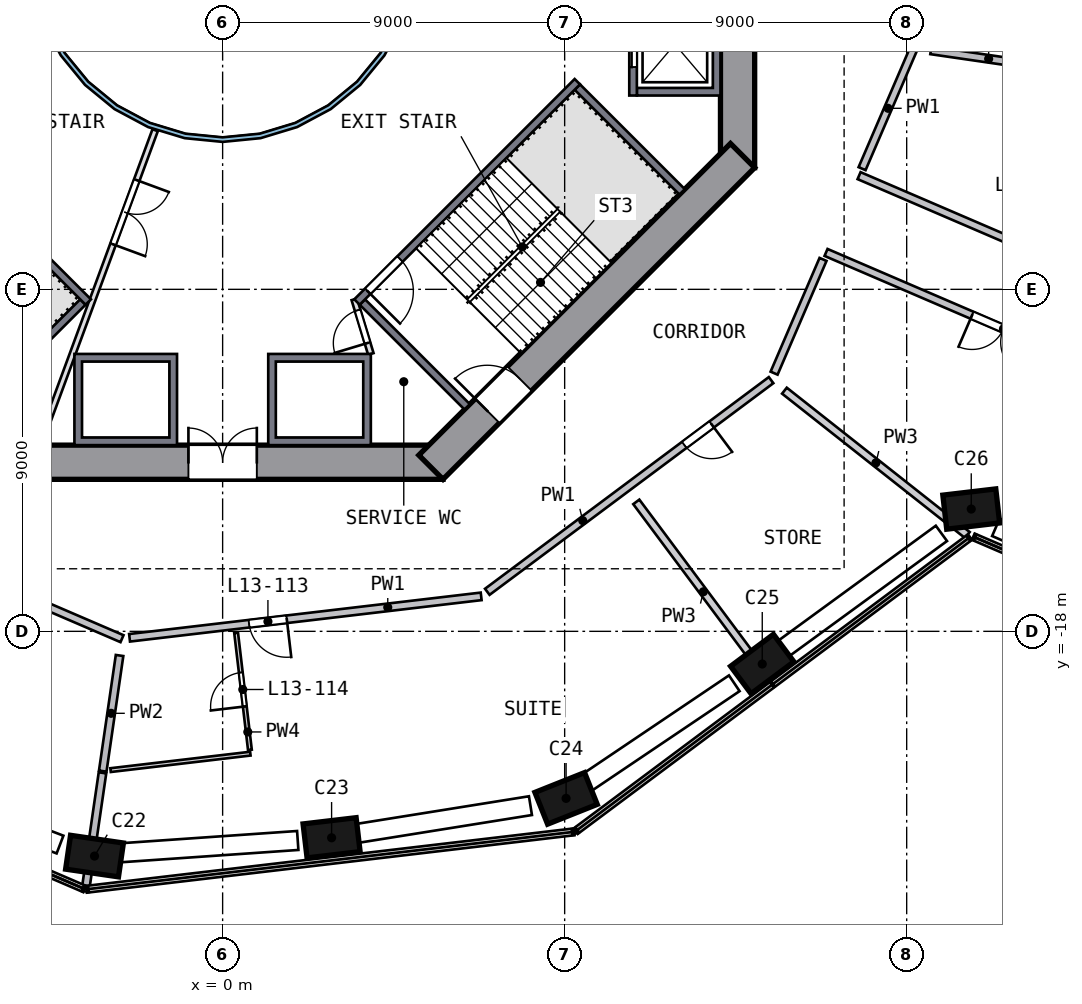
"""IFC4 building model, lengths in metres.
Left out: names, types, materials, properties, quantities, classifications, styles, units other than length and angle.
Written with IfcOpenShell. Run it as: python <this file> out.ifc"""

import sys

from ifc_helpers import new_model, si_unit, direction, frame, frame_2d, origin, origin_2d, place, context, subcontext, project, spatial, polyline, rectangle, outline, extrude, element, fill, save


model = new_model("IFC4")
c1 = context("Model", 3, precision=1e-05, world=origin(), true_north=direction((0.0, 1.0)))
c2 = subcontext(c1, "Body", "Model", "MODEL_VIEW")
j1 = project(units=[si_unit("LENGTHUNIT", "METRE"), si_unit("PLANEANGLEUNIT", "RADIAN")], contexts=[c1])
p1 = place(None, origin())
s1 = spatial("IfcSite", under=j1, at=p1, CompositionType="ELEMENT")
p2 = place(p1, origin())
s2 = spatial("IfcBuilding", under=s1, at=p2, CompositionType="ELEMENT")
p3 = place(p2, frame((0.0, 0.0, 60.0)))
s3 = spatial("IfcBuildingStorey", under=s2, at=p3, CompositionType="ELEMENT", Elevation=60.0)
p4 = place(p3, frame((-3.478, -23.899, 0.0), z_axis=(0.0887341, -0.012187156, 0.995980789), x_axis=(-0.985538451, 0.143848052, 0.089563943)))
e1 = element("IfcColumn", 1, at=p4, inside=s3, PredefinedType="COLUMN", context=c2, shape_type="SweptSolid", body=[
    extrude(rectangle(XDim=1.4, YDim=0.9, at=origin_2d()), origin(), (0.0, 0.0, 1.0), 4.207),
])
p5 = place(p3, frame((2.763, -23.446, 0.0), z_axis=(0.0868348, 0.010970439, 0.99616232), x_axis=(0.989325596, 0.116510829, -0.087521946)))
e2 = element("IfcColumn", 2, at=p5, inside=s3, PredefinedType="COLUMN", context=c2, shape_type="SweptSolid", body=[
    extrude(rectangle(XDim=1.4, YDim=0.9, at=origin_2d()), origin(), (0.0, 0.0, 1.0), 4.206),
])
p6 = place(p3, frame((8.938, -22.437, 0.0), z_axis=(0.082930694, 0.033833866, 0.995980808), x_axis=(-0.925330874, -0.368430604, 0.089563737)))
e3 = element("IfcColumn", 3, at=p6, inside=s3, PredefinedType="COLUMN", context=c2, shape_type="SweptSolid", body=[
    extrude(rectangle(XDim=1.4, YDim=0.9, at=origin_2d()), origin(), (0.0, 0.0, 1.0), 4.207),
])
p7 = place(p3, frame((14.115, -18.924, 0.0), z_axis=(0.069769341, 0.052936472, 0.996157602), x_axis=(0.798641913, 0.595400375, -0.087575616)))
e4 = element("IfcColumn", 4, at=p7, inside=s3, PredefinedType="COLUMN", context=c2, shape_type="SweptSolid", body=[
    extrude(rectangle(XDim=1.4, YDim=0.9, at=origin_2d()), origin(), (0.0, 0.0, 1.0), 4.206),
])
p8 = place(p3, frame((19.633, -14.87, 0.0), z_axis=(0.054543369, 0.073227374, 0.995822661), x_axis=(-0.99170285, -0.112293396, 0.062575163)))
e5 = element("IfcColumn", 5, at=p8, inside=s3, PredefinedType="COLUMN", context=c2, shape_type="SweptSolid", body=[
    extrude(rectangle(XDim=1.4, YDim=0.9, at=origin_2d()), origin(), (0.0, 0.0, 1.0), 4.208),
])
p9 = place(p3, frame((13.55, -5.799, 0.0), z_axis=(0.0, 0.0, 1.0), x_axis=(0.0, 1.0, 0.0)))
e6 = element("IfcWall", 6, at=p9, inside=s3, PredefinedType="SHEAR", context=c2, shape_type="SweptSolid", body=[
    extrude(rectangle(XDim=11.598, YDim=0.9, at=frame_2d((5.799, 0.0))), origin(), (0.0, 0.0, 1.0), 4.5),
])
p10 = place(p9, frame((4.899, 0.0, 0.0)))
e7 = element("IfcOpeningElement", 7, at=p10, cuts=e6, PredefinedType="OPENING", context=c2, shape_type="SweptSolid", body=[
    extrude(rectangle(XDim=1.8, YDim=2.1, at=frame_2d((0.9, 1.05))), frame((0.0, 0.46, 0.0), z_axis=(0.0, -1.0, 0.0), x_axis=(1.0, 0.0, 0.0)), (0.0, 0.0, 1.0), 0.92),
])
p11 = place(p3, frame((-5.799, -13.55, 0.0), z_axis=(0.0, 0.0, 1.0), x_axis=(1.0, 0.0, 0.0)))
e8 = element("IfcWall", 8, at=p11, inside=s3, PredefinedType="SHEAR", context=c2, shape_type="SweptSolid", body=[
    extrude(rectangle(XDim=11.598, YDim=0.9, at=frame_2d((5.799, 0.0))), origin(), (0.0, 0.0, 1.0), 4.5),
])
p12 = place(p11, frame((4.899, 0.0, 0.0)))
e9 = element("IfcOpeningElement", 9, at=p12, cuts=e8, PredefinedType="OPENING", context=c2, shape_type="SweptSolid", body=[
    extrude(rectangle(XDim=1.8, YDim=2.1, at=frame_2d((0.9, 1.05))), frame((0.0, 0.46, 0.0), z_axis=(0.0, -1.0, 0.0), x_axis=(1.0, 0.0, 0.0)), (0.0, 0.0, 1.0), 0.92),
])
p13 = place(p3, frame((5.481, -13.682, 0.0), z_axis=(0.0, 0.0, 1.0), x_axis=(0.707106781, 0.707106781, 0.0)))
e10 = element("IfcWall", 10, at=p13, inside=s3, PredefinedType="SHEAR", context=c2, shape_type="SweptSolid", body=[
    extrude(rectangle(XDim=11.598, YDim=0.9, at=frame_2d((5.799, 0.0))), origin(), (0.0, 0.0, 1.0), 4.5),
])
p14 = place(p13, frame((2.099, 0.0, 0.0)))
e11 = element("IfcOpeningElement", 11, at=p14, cuts=e10, PredefinedType="OPENING", context=c2, shape_type="SweptSolid", body=[
    extrude(rectangle(XDim=1.2, YDim=2.1, at=frame_2d((0.6, 1.05))), frame((0.0, 0.46, 0.0), z_axis=(0.0, -1.0, 0.0), x_axis=(1.0, 0.0, 0.0)), (0.0, 0.0, 1.0), 0.92),
])
p15 = place(p3, origin())
e12 = element("IfcWall", 12, at=p15, inside=s3, PredefinedType="SOLIDWALL", context=c2, shape_type="SweptSolid", body=[
    extrude(outline(polyline([(13.1, -3.9), (10.9, -3.9), (10.9, -3.7), (12.9, -3.7), (12.9, -1.4), (10.9, -1.4), (10.9, -1.2), (13.1, -1.2), (13.1, -3.9)])), origin(), (0.0, 0.0, 1.0), 4.19),
])
p16 = place(p3, frame((10.8, -1.2, 0.0), z_axis=(0.0, 0.0, 1.0), x_axis=(0.0, -1.0, 0.0)))
e13 = element("IfcWall", 13, at=p16, inside=s3, PredefinedType="SOLIDWALL", context=c2, shape_type="SweptSolid", body=[
    extrude(rectangle(XDim=2.7, YDim=0.2, at=frame_2d((1.35, 0.0))), origin(), (0.0, 0.0, 1.0), 4.19),
])
p17 = place(p16, frame((0.75, 0.0, 0.0)))
e14 = element("IfcOpeningElement", 14, at=p17, cuts=e13, PredefinedType="OPENING", context=c2, shape_type="SweptSolid", body=[
    extrude(rectangle(XDim=1.2, YDim=2.1, at=frame_2d((0.6, 1.05))), frame((0.0, 0.11, 0.0), z_axis=(0.0, -1.0, 0.0), x_axis=(1.0, 0.0, 0.0)), (0.0, 0.0, 1.0), 0.22),
])
p18 = place(p3, origin())
e15 = element("IfcWall", 15, at=p18, inside=s3, PredefinedType="SOLIDWALL", context=c2, shape_type="SweptSolid", body=[
    extrude(outline(polyline([(-1.2, -13.1), (-3.9, -13.1), (-3.9, -10.7), (-1.2, -10.7), (-1.2, -13.1)]), holes=[polyline([(-3.7, -10.9), (-3.7, -12.9), (-1.4, -12.9), (-1.4, -10.9), (-3.7, -10.9)])]), origin(), (0.0, 0.0, 1.0), 4.19),
])
p19 = place(p3, origin())
e16 = element("IfcWall", 16, at=p19, inside=s3, PredefinedType="SOLIDWALL", context=c2, shape_type="SweptSolid", body=[
    extrude(outline(polyline([(3.9, -10.7), (3.9, -13.1), (1.2, -13.1), (1.2, -10.7), (3.9, -10.7)]), holes=[polyline([(1.4, -12.9), (3.7, -12.9), (3.7, -10.9), (1.4, -10.9), (1.4, -12.9)])]), origin(), (0.0, 0.0, 1.0), 4.19),
])
p20 = place(p3, frame((-3.535, -9.334, 0.0), z_axis=(0.0, 0.0, 1.0), x_axis=(-0.707106781, 0.707106781, 0.0)))
e17 = element("IfcWall", 17, at=p20, inside=s3, PredefinedType="SOLIDWALL", context=c2, shape_type="SweptSolid", body=[
    extrude(rectangle(XDim=8.2, YDim=0.2, at=frame_2d((4.1, 0.0))), origin(), (0.0, 0.0, 1.0), 4.19),
])
p21 = place(p20, frame((6.6, 0.0, 0.0)))
e18 = element("IfcOpeningElement", 18, at=p21, cuts=e17, PredefinedType="OPENING", context=c2, shape_type="SweptSolid", body=[
    extrude(rectangle(XDim=1.2, YDim=2.1, at=frame_2d((0.6, 1.05))), frame((0.0, 0.11, 0.0), z_axis=(0.0, -1.0, 0.0), x_axis=(1.0, 0.0, 0.0)), (0.0, 0.0, 1.0), 0.22),
])
p22 = place(p3, frame((-3.677, -9.334, 0.0), z_axis=(0.0, 0.0, 1.0), x_axis=(-0.707106781, -0.707106781, 0.0)))
e19 = element("IfcWall", 19, at=p22, inside=s3, PredefinedType="SOLIDWALL", context=c2, shape_type="SweptSolid", body=[
    extrude(rectangle(XDim=3.9, YDim=0.2, at=frame_2d((1.95, 0.0))), origin(), (0.0, 0.0, 1.0), 4.19),
])
p23 = place(p3, frame((9.334, -3.535, 0.0), z_axis=(0.0, 0.0, 1.0), x_axis=(-0.707106781, -0.707106781, 0.0)))
e20 = element("IfcWall", 20, at=p23, inside=s3, PredefinedType="SOLIDWALL", context=c2, shape_type="SweptSolid", body=[
    extrude(rectangle(XDim=8.2, YDim=0.2, at=frame_2d((4.1, 0.0))), origin(), (0.0, 0.0, 1.0), 4.19),
])
p24 = place(p23, frame((6.6, 0.0, 0.0)))
e21 = element("IfcOpeningElement", 21, at=p24, cuts=e20, PredefinedType="OPENING", context=c2, shape_type="SweptSolid", body=[
    extrude(rectangle(XDim=1.2, YDim=2.1, at=frame_2d((0.6, 1.05))), frame((0.0, 0.11, 0.0), z_axis=(0.0, -1.0, 0.0), x_axis=(1.0, 0.0, 0.0)), (0.0, 0.0, 1.0), 0.22),
])
for number, where, z_axis, x_axis in (
    (22, (3.677, -9.334, 0.0), (0.0, 0.0, 1.0), (0.707, -0.707, 0.0)),
    (23, (9.334, -3.677, 0.0), (0.0, 0.0, 1.0), (0.707, -0.707, 0.0)),
):
    element("IfcWall", number, at=place(p3, frame(where, z_axis=z_axis, x_axis=x_axis)), inside=s3, PredefinedType="SOLIDWALL", context=c2, shape_type="SweptSolid", body=[
        extrude(rectangle(XDim=3.9, YDim=0.2, at=frame_2d((1.95, 0.0))), origin(), (0.0, 0.0, 1.0), 4.19),
    ])
p25 = place(p3, frame((3.9, -10.7, 0.0), z_axis=(0.0, 0.0, 1.0), x_axis=(-0.289808785, 0.957084567, 0.0)))
e24 = element("IfcWall", 24, at=p25, inside=s3, PredefinedType="PARTITIONING", context=c2, shape_type="SweptSolid", body=[
    extrude(rectangle(XDim=1.501, YDim=0.15, at=frame_2d((0.75, 0.0))), origin(), (0.0, 0.0, 1.0), 4.19),
])
p26 = place(p25, frame((0.301, 0.0, 0.0)))
e25 = element("IfcOpeningElement", 25, at=p26, cuts=e24, PredefinedType="OPENING", context=c2, shape_type="SweptSolid", body=[
    extrude(rectangle(XDim=0.9, YDim=2.1, at=frame_2d((0.45, 1.05))), frame((0.0, 0.085, 0.0), z_axis=(0.0, -1.0, 0.0), x_axis=(1.0, 0.0, 0.0)), (0.0, 0.0, 1.0), 0.17),
])
p27 = place(p3, frame((-1.776, -4.813, 0.0), z_axis=(0.0, 0.0, 1.0), x_axis=(-0.346112737, -0.93819293, 0.0)))
e26 = element("IfcWall", 26, at=p27, inside=s3, PredefinedType="PARTITIONING", context=c2, shape_type="SweptSolid", body=[
    extrude(rectangle(XDim=8.803, YDim=0.15, at=frame_2d((4.402, 0.0))), origin(), (0.0, 0.0, 1.0), 4.19),
])
p28 = place(p27, frame((1.4, 0.0, 0.0)))
e27 = element("IfcOpeningElement", 27, at=p28, cuts=e26, PredefinedType="OPENING", context=c2, shape_type="SweptSolid", body=[
    extrude(rectangle(XDim=1.8, YDim=2.1, at=frame_2d((0.9, 1.05))), frame((0.0, 0.085, 0.0), z_axis=(0.0, -1.0, 0.0), x_axis=(1.0, 0.0, 0.0)), (0.0, 0.0, 1.0), 0.17),
])
p29 = place(p3, origin())
e28 = element("IfcWall", 28, at=p29, inside=s3, PredefinedType="SOLIDWALL", context=c2, shape_type="SweptSolid", body=[
    extrude(outline(polyline([(5.021, -0.999), (4.73, -1.959), (4.257, -2.844), (3.62, -3.62), (2.844, -4.257), (1.959, -4.73), (0.999, -5.021), (0.0, -5.12), (-0.999, -5.021), (-1.959, -4.73), (-2.844, -4.257), (-3.62, -3.62), (-4.257, -2.844), (-4.73, -1.959), (-5.021, -0.999), (-5.12, 0.0), (-5.021, 0.999), (-4.73, 1.959), (-4.257, 2.844), (-3.62, 3.62), (-2.844, 4.257), (-1.959, 4.73), (-0.999, 5.021), (0.0, 5.12), (0.999, 5.021), (1.959, 4.73), (2.844, 4.257), (3.62, 3.62), (4.257, 2.844), (4.73, 1.959), (5.021, 0.999), (5.12, 0.0), (5.021, -0.999)]), holes=[polyline([(4.904, 0.976), (4.619, 1.913), (4.157, 2.778), (3.535, 3.535), (2.778, 4.157), (1.913, 4.619), (0.976, 4.904), (0.0, 5.0), (-0.976, 4.904), (-1.913, 4.619), (-2.778, 4.157), (-3.535, 3.535), (-4.157, 2.778), (-4.619, 1.913), (-4.904, 0.976), (-5.0, 0.0), (-4.904, -0.976), (-4.619, -1.913), (-4.157, -2.778), (-3.535, -3.535), (-2.778, -4.157), (-1.913, -4.619), (-0.976, -4.904), (0.0, -5.0), (0.976, -4.904), (1.913, -4.619), (2.778, -4.157), (3.535, -3.535), (4.157, -2.778), (4.619, -1.913), (4.904, -0.976), (5.0, 0.0), (4.904, 0.976)])]), origin(), (0.0, 0.0, 1.0), 4.19),
])
p30 = place(p3, frame((-2.648, -18.193, 0.0), z_axis=(0.0, 0.0, 1.0), x_axis=(-0.918585672, 0.395221918, 0.0)))
e29 = element("IfcWall", 29, at=p30, inside=s3, PredefinedType="SOLIDWALL", context=c2, shape_type="SweptSolid", body=[
    extrude(rectangle(XDim=9.317, YDim=0.2, at=frame_2d((4.658, 0.0))), origin(), (0.0, 0.0, 1.0), 4.19),
])
p31 = place(p30, frame((5.15, 0.0, 0.0)))
e30 = element("IfcOpeningElement", 30, at=p31, cuts=e29, PredefinedType="OPENING", context=c2, shape_type="SweptSolid", body=[
    extrude(rectangle(XDim=1.0, YDim=2.1, at=frame_2d((0.5, 1.05))), frame((0.0, 0.11, 0.0), z_axis=(0.0, -1.0, 0.0), x_axis=(1.0, 0.0, 0.0)), (0.0, 0.0, 1.0), 0.22),
])
p32 = place(p3, frame((6.803, -17.08, 0.0), z_axis=(0.0, 0.0, 1.0), x_axis=(-0.993130375, -0.117013065, 0.0)))
e31 = element("IfcWall", 31, at=p32, inside=s3, PredefinedType="SOLIDWALL", context=c2, shape_type="SweptSolid", body=[
    extrude(rectangle(XDim=9.316, YDim=0.2, at=frame_2d((4.658, 0.0))), origin(), (0.0, 0.0, 1.0), 4.19),
])
p33 = place(p32, frame((5.15, 0.0, 0.0)))
e32 = element("IfcOpeningElement", 32, at=p33, cuts=e31, PredefinedType="OPENING", context=c2, shape_type="SweptSolid", body=[
    extrude(rectangle(XDim=1.0, YDim=2.1, at=frame_2d((0.5, 1.05))), frame((0.0, 0.11, 0.0), z_axis=(0.0, -1.0, 0.0), x_axis=(1.0, 0.0, 0.0)), (0.0, 0.0, 1.0), 0.22),
])
p34 = place(p3, frame((14.432, -11.389, 0.0), z_axis=(0.0, 0.0, 1.0), x_axis=(-0.801560206, -0.59791407, 0.0)))
e33 = element("IfcWall", 33, at=p34, inside=s3, PredefinedType="SOLIDWALL", context=c2, shape_type="SweptSolid", body=[
    extrude(rectangle(XDim=9.316, YDim=0.2, at=frame_2d((4.658, 0.0))), origin(), (0.0, 0.0, 1.0), 4.19),
])
p35 = place(p34, frame((1.95, 0.0, 0.0)))
e34 = element("IfcOpeningElement", 34, at=p35, cuts=e33, PredefinedType="OPENING", context=c2, shape_type="SweptSolid", body=[
    extrude(rectangle(XDim=0.9, YDim=2.1, at=frame_2d((0.45, 1.05))), frame((0.0, 0.11, 0.0), z_axis=(0.0, -1.0, 0.0), x_axis=(1.0, 0.0, 0.0)), (0.0, 0.0, 1.0), 0.22),
])
p36 = place(p3, frame((14.511, -11.206, 0.0), z_axis=(0.0, 0.0, 1.0), x_axis=(0.395166864, 0.918609357, 0.0)))
e35 = element("IfcWall", 35, at=p36, inside=s3, PredefinedType="SOLIDWALL", context=c2, shape_type="SweptSolid", body=[
    extrude(rectangle(XDim=3.258, YDim=0.2, at=frame_2d((1.629, 0.0))), origin(), (0.0, 0.0, 1.0), 4.19),
])
p37 = place(p3, frame((16.826, -5.824, 0.0), z_axis=(0.0, 0.0, 1.0), x_axis=(0.39522258, 0.918585386, 0.0)))
e36 = element("IfcWall", 36, at=p37, inside=s3, PredefinedType="SOLIDWALL", context=c2, shape_type="SweptSolid", body=[
    extrude(rectangle(XDim=3.458, YDim=0.2, at=frame_2d((1.729, 0.0))), origin(), (0.0, 0.0, 1.0), 4.19),
])
p38 = place(p3, frame((30.91, -14.497, 0.0), z_axis=(0.0, 0.0, 1.0), x_axis=(-0.91858541, 0.395222525, 0.0)))
e37 = element("IfcWall", 37, at=p38, inside=s3, PredefinedType="SOLIDWALL", context=c2, shape_type="SweptSolid", body=[
    extrude(rectangle(XDim=16.364, YDim=0.2, at=frame_2d((8.182, 0.0))), origin(), (0.0, 0.0, 1.0), 4.19),
])
p39 = place(p38, frame((10.381, 0.0, 0.0)))
e38 = element("IfcOpeningElement", 38, at=p39, cuts=e37, PredefinedType="OPENING", context=c2, shape_type="SweptSolid", body=[
    extrude(rectangle(XDim=1.8, YDim=2.1, at=frame_2d((0.9, 1.05))), frame((0.0, 0.11, 0.0), z_axis=(0.0, -1.0, 0.0), x_axis=(1.0, 0.0, 0.0)), (0.0, 0.0, 1.0), 0.22),
])
p40 = place(p3, frame((16.747, -6.008, 0.0), z_axis=(0.0, 0.0, 1.0), x_axis=(0.918584259, -0.3952252, 0.0)))
e39 = element("IfcWall", 39, at=p40, inside=s3, PredefinedType="SOLIDWALL", context=c2, shape_type="SweptSolid", body=[
    extrude(rectangle(XDim=16.466, YDim=0.2, at=frame_2d((8.233, 0.0))), origin(), (0.0, 0.0, 1.0), 4.19),
])
p41 = place(p40, frame((4.15, 0.0, 0.0)))
e40 = element("IfcOpeningElement", 40, at=p41, cuts=e39, PredefinedType="OPENING", context=c2, shape_type="SweptSolid", body=[
    extrude(rectangle(XDim=1.8, YDim=2.1, at=frame_2d((0.9, 1.05))), frame((0.0, 0.11, 0.0), z_axis=(0.0, -1.0, 0.0), x_axis=(1.0, 0.0, 0.0)), (0.0, 0.0, 1.0), 0.22),
])
p42 = place(p3, frame((-3.161, -21.724, 0.0), z_axis=(0.0, 0.0, 1.0), x_axis=(-0.144065429, -0.989568164, 0.0)))
e41 = element("IfcWall", 41, at=p42, inside=s3, PredefinedType="SOLIDWALL", context=c2, shape_type="SweptSolid", body=[
    extrude(rectangle(XDim=3.011, YDim=0.2, at=frame_2d((1.506, 0.0))), origin(), (0.0, 0.0, 1.0), 4.19),
])
for number, where, z_axis, x_axis in (
    (42, (-2.712, -18.636, 0.0), (0.0, 0.0, 1.0), (-0.144, -0.99, 0.0)),
    (43, (18.636, -2.712, 0.0), (0.0, 0.0, 1.0), (0.99, -0.144, 0.0)),
):
    element("IfcWall", number, at=place(p3, frame(where, z_axis=z_axis, x_axis=x_axis)), inside=s3, PredefinedType="SOLIDWALL", context=c2, shape_type="SweptSolid", body=[
        extrude(rectangle(XDim=3.075, YDim=0.2, at=frame_2d((1.537, 0.0))), origin(), (0.0, 0.0, 1.0), 4.19),
    ])
p43 = place(p3, frame((0.729, -21.219, 0.0), z_axis=(0.0, 0.0, 1.0), x_axis=(-0.993132145, -0.116998046, 0.0)))
e44 = element("IfcWall", 44, at=p43, inside=s3, PredefinedType="PARTITIONING", context=c2, shape_type="SweptSolid", body=[
    extrude(rectangle(XDim=3.704, YDim=0.1, at=frame_2d((1.852, 0.0))), origin(), (0.0, 0.0, 1.0), 4.19),
])
p44 = place(p3, frame((0.718, -21.119, 0.0), z_axis=(0.0, 0.0, 1.0), x_axis=(-0.117033166, 0.993128007, 0.0)))
e45 = element("IfcWall", 45, at=p44, inside=s3, PredefinedType="PARTITIONING", context=c2, shape_type="SweptSolid", body=[
    extrude(rectangle(XDim=3.1, YDim=0.1, at=frame_2d((1.55, 0.0))), origin(), (0.0, 0.0, 1.0), 4.19),
])
p45 = place(p44, frame((1.15, 0.0, 0.0)))
e46 = element("IfcOpeningElement", 46, at=p45, cuts=e45, PredefinedType="OPENING", context=c2, shape_type="SweptSolid", body=[
    extrude(rectangle(XDim=0.9, YDim=2.1, at=frame_2d((0.45, 1.05))), frame((0.0, 0.06, 0.0), z_axis=(0.0, -1.0, 0.0), x_axis=(1.0, 0.0, 0.0)), (0.0, 0.0, 1.0), 0.12),
])
p46 = place(p3, frame((14.415, -19.324, 0.0), z_axis=(0.0, 0.0, 1.0), x_axis=(-0.597906765, 0.801565655, 0.0)))
e47 = element("IfcWall", 47, at=p46, inside=s3, PredefinedType="SOLIDWALL", context=c2, shape_type="SweptSolid", body=[
    extrude(rectangle(XDim=5.903, YDim=0.2, at=frame_2d((2.951, 0.0))), origin(), (0.0, 0.0, 1.0), 4.19),
])
p47 = place(p3, frame((14.783, -11.667, 0.0), z_axis=(0.0, 0.0, 1.0), x_axis=(0.78499995, -0.619495827, 0.0)))
e48 = element("IfcWall", 48, at=p47, inside=s3, PredefinedType="SOLIDWALL", context=c2, shape_type="SweptSolid", body=[
    extrude(rectangle(XDim=6.132, YDim=0.2, at=frame_2d((3.066, 0.0))), origin(), (0.0, 0.0, 1.0), 4.19),
])
p48 = place(p17, origin())
e49 = element("IfcDoor", 49, at=p48, inside=s3, OperationType="DOUBLE_DOOR_SLIDING", PredefinedType="DOOR", context=c2, shape_type="SweptSolid", body=[
    extrude(rectangle(XDim=1.2, YDim=2.1, at=frame_2d((0.6, 1.05))), frame((0.0, 0.025, 0.0), z_axis=(0.0, -1.0, 0.0), x_axis=(1.0, 0.0, 0.0)), (0.0, 0.0, 1.0), 0.05),
])
fill(e14, e49)
p49 = place(p24, origin())
e50 = element("IfcDoor", 50, at=p49, inside=s3, OperationType="SINGLE_SWING_RIGHT", PredefinedType="DOOR", context=c2, shape_type="SweptSolid", body=[
    extrude(rectangle(XDim=1.2, YDim=2.1, at=frame_2d((0.6, 1.05))), frame((0.0, 0.025, 0.0), z_axis=(0.0, -1.0, 0.0), x_axis=(1.0, 0.0, 0.0)), (0.0, 0.0, 1.0), 0.05),
])
fill(e21, e50)
p50 = place(p12, origin())
e51 = element("IfcDoor", 51, at=p50, inside=s3, OperationType="DOUBLE_DOOR_SINGLE_SWING", PredefinedType="DOOR", context=c2, shape_type="SweptSolid", body=[
    extrude(rectangle(XDim=1.8, YDim=2.1, at=frame_2d((0.9, 1.05))), frame((0.0, 0.025, 0.0), z_axis=(0.0, -1.0, 0.0), x_axis=(1.0, 0.0, 0.0)), (0.0, 0.0, 1.0), 0.05),
])
fill(e9, e51)
p51 = place(p14, origin())
e52 = element("IfcDoor", 52, at=p51, inside=s3, OperationType="SINGLE_SWING_LEFT", PredefinedType="DOOR", context=c2, shape_type="SweptSolid", body=[
    extrude(rectangle(XDim=1.2, YDim=2.1, at=frame_2d((0.6, 1.05))), frame((0.0, 0.025, 0.0), z_axis=(0.0, -1.0, 0.0), x_axis=(1.0, 0.0, 0.0)), (0.0, 0.0, 1.0), 0.05),
])
fill(e11, e52)
p52 = place(p26, origin())
e53 = element("IfcDoor", 53, at=p52, inside=s3, OperationType="SINGLE_SWING_LEFT", PredefinedType="DOOR", context=c2, shape_type="SweptSolid", body=[
    extrude(rectangle(XDim=0.9, YDim=2.1, at=frame_2d((0.45, 1.05))), frame((0.0, 0.025, 0.0), z_axis=(0.0, -1.0, 0.0), x_axis=(1.0, 0.0, 0.0)), (0.0, 0.0, 1.0), 0.05),
])
fill(e25, e53)
p53 = place(p28, origin())
e54 = element("IfcDoor", 54, at=p53, inside=s3, OperationType="DOUBLE_DOOR_SINGLE_SWING", PredefinedType="DOOR", context=c2, shape_type="SweptSolid", body=[
    extrude(rectangle(XDim=1.8, YDim=2.1, at=frame_2d((0.9, 1.05))), frame((0.0, 0.025, 0.0), z_axis=(0.0, -1.0, 0.0), x_axis=(1.0, 0.0, 0.0)), (0.0, 0.0, 1.0), 0.05),
])
fill(e27, e54)
p54 = place(p33, origin())
e55 = element("IfcDoor", 55, at=p54, inside=s3, OperationType="SINGLE_SWING_LEFT", PredefinedType="DOOR", context=c2, shape_type="SweptSolid", body=[
    extrude(rectangle(XDim=1.0, YDim=2.1, at=frame_2d((0.5, 1.05))), frame((0.0, 0.025, 0.0), z_axis=(0.0, -1.0, 0.0), x_axis=(1.0, 0.0, 0.0)), (0.0, 0.0, 1.0), 0.05),
])
fill(e32, e55)
p55 = place(p45, origin())
e56 = element("IfcDoor", 56, at=p55, inside=s3, OperationType="SINGLE_SWING_LEFT", PredefinedType="DOOR", context=c2, shape_type="SweptSolid", body=[
    extrude(rectangle(XDim=0.9, YDim=2.1, at=frame_2d((0.45, 1.05))), frame((0.0, 0.025, 0.0), z_axis=(0.0, -1.0, 0.0), x_axis=(1.0, 0.0, 0.0)), (0.0, 0.0, 1.0), 0.05),
])
fill(e46, e56)
p56 = place(p35, origin())
e57 = element("IfcDoor", 57, at=p56, inside=s3, OperationType="SINGLE_SWING_LEFT", PredefinedType="DOOR", context=c2, shape_type="SweptSolid", body=[
    extrude(rectangle(XDim=0.9, YDim=2.1, at=frame_2d((0.45, 1.05))), frame((0.0, 0.025, 0.0), z_axis=(0.0, -1.0, 0.0), x_axis=(1.0, 0.0, 0.0)), (0.0, 0.0, 1.0), 0.05),
])
fill(e34, e57)
p57 = place(p39, origin())
e58 = element("IfcDoor", 58, at=p57, inside=s3, OperationType="DOUBLE_DOOR_SINGLE_SWING", PredefinedType="DOOR", context=c2, shape_type="SweptSolid", body=[
    extrude(rectangle(XDim=1.8, YDim=2.1, at=frame_2d((0.9, 1.05))), frame((0.0, 0.025, 0.0), z_axis=(0.0, -1.0, 0.0), x_axis=(1.0, 0.0, 0.0)), (0.0, 0.0, 1.0), 0.05),
])
fill(e38, e58)
save(model, sys.argv[1])
